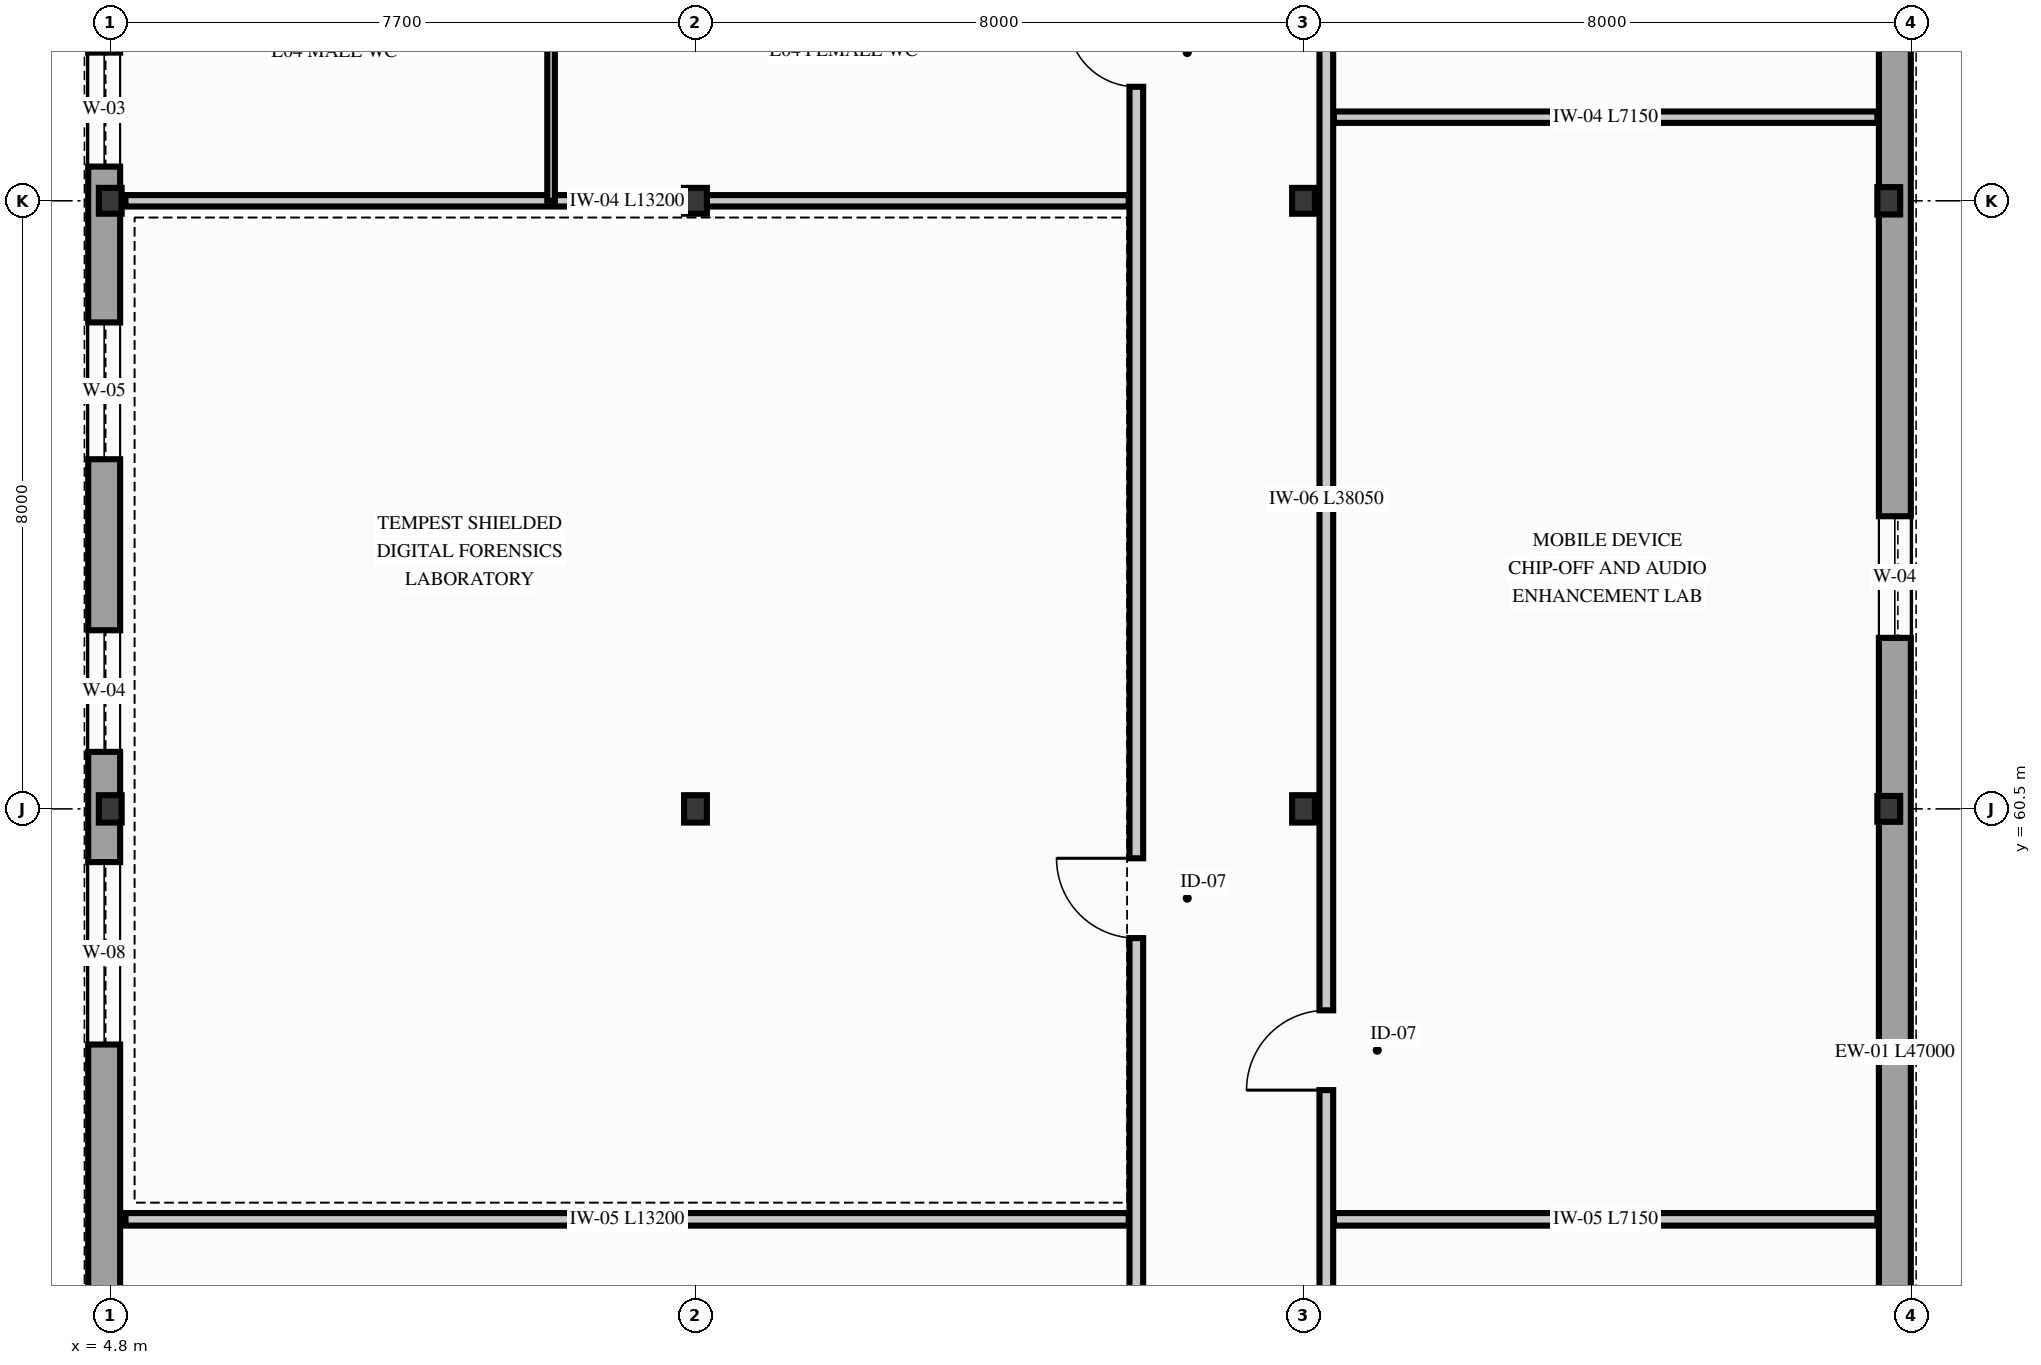
"""IFC4 building model, lengths in metres.
Left out: names, types, materials, properties, quantities, classifications, styles, units other than length and angle.
Written with IfcOpenShell. Run it as: python <this file> out.ifc"""

import sys

from ifc_helpers import new_model, si_unit, direction, frame, frame_2d, origin, origin_2d, place, context, subcontext, project, spatial, rectangle, i_section, extrude, element, fill, save


model = new_model("IFC4")
c1 = context("Model", 3, precision=1e-05, world=origin(), true_north=direction((0.0, 1.0)))
c2 = subcontext(c1, "Body", "Model", "MODEL_VIEW")
j1 = project(units=[si_unit("LENGTHUNIT", "METRE"), si_unit("PLANEANGLEUNIT", "RADIAN")], contexts=[c1])
p1 = place(None, origin())
s1 = spatial("IfcSite", under=j1, at=p1, CompositionType="ELEMENT")
p2 = place(p1, origin())
s2 = spatial("IfcBuilding", under=s1, at=p2, CompositionType="ELEMENT")
p3 = place(p2, frame((0.0, 0.0, 17.7)))
s3 = spatial("IfcBuildingStorey", under=s2, at=p3, CompositionType="ELEMENT", Elevation=17.7)
p4 = place(p3, frame((4.8, 60.5, 0.0), z_axis=(0.0, 0.0, 1.0), x_axis=(1.0, 0.0, 0.0)))
e1 = element("IfcColumn", 1, at=p4, inside=s3, PredefinedType="COLUMN", context=c2, shape_type="SweptSolid", body=[
    extrude(i_section(OverallWidth=0.3, OverallDepth=0.36, WebThickness=0.012, FlangeThickness=0.022, FilletRadius=0.027, at=origin_2d()), origin(), (0.0, 0.0, 1.0), 3.9),
])
p5 = place(p3, frame((4.8, 68.5, 0.0), z_axis=(0.0, 0.0, 1.0), x_axis=(1.0, 0.0, 0.0)))
e2 = element("IfcColumn", 2, at=p5, inside=s3, PredefinedType="COLUMN", context=c2, shape_type="SweptSolid", body=[
    extrude(i_section(OverallWidth=0.3, OverallDepth=0.34, WebThickness=0.012, FlangeThickness=0.021, FilletRadius=0.027, at=origin_2d()), origin(), (0.0, 0.0, 1.0), 3.9),
])
p6 = place(p3, frame((12.5, 60.5, 0.0), z_axis=(0.0, 0.0, 1.0), x_axis=(1.0, 0.0, 0.0)))
e3 = element("IfcColumn", 3, at=p6, inside=s3, PredefinedType="COLUMN", context=c2, shape_type="SweptSolid", body=[
    extrude(i_section(OverallWidth=0.3, OverallDepth=0.36, WebThickness=0.012, FlangeThickness=0.022, FilletRadius=0.027, at=origin_2d()), origin(), (0.0, 0.0, 1.0), 3.9),
])
p7 = place(p3, frame((12.5, 68.5, 0.0), z_axis=(0.0, 0.0, 1.0), x_axis=(1.0, 0.0, 0.0)))
e4 = element("IfcColumn", 4, at=p7, inside=s3, PredefinedType="COLUMN", context=c2, shape_type="SweptSolid", body=[
    extrude(i_section(OverallWidth=0.3, OverallDepth=0.34, WebThickness=0.012, FlangeThickness=0.021, FilletRadius=0.027, at=origin_2d()), origin(), (0.0, 0.0, 1.0), 3.9),
])
p8 = place(p3, frame((20.5, 60.5, 0.0), z_axis=(0.0, 0.0, 1.0), x_axis=(1.0, 0.0, 0.0)))
e5 = element("IfcColumn", 5, at=p8, inside=s3, PredefinedType="COLUMN", context=c2, shape_type="SweptSolid", body=[
    extrude(i_section(OverallWidth=0.3, OverallDepth=0.36, WebThickness=0.012, FlangeThickness=0.022, FilletRadius=0.027, at=origin_2d()), origin(), (0.0, 0.0, 1.0), 3.9),
])
for number, where, z_axis, x_axis in (
    (6, (20.5, 68.5, 0.0), (0.0, 0.0, 1.0), (1.0, 0.0, 0.0)),
    (7, (28.2, 60.5, 0.0), (0.0, 0.0, 1.0), (1.0, 0.0, 0.0)),
):
    element("IfcColumn", number, at=place(p3, frame(where, z_axis=z_axis, x_axis=x_axis)), inside=s3, PredefinedType="COLUMN", context=c2, shape_type="SweptSolid", body=[
        extrude(i_section(OverallWidth=0.3, OverallDepth=0.34, WebThickness=0.012, FlangeThickness=0.021, FilletRadius=0.027, at=origin_2d()), origin(), (0.0, 0.0, 1.0), 3.9),
    ])
p9 = place(p3, frame((28.2, 68.5, 0.0), z_axis=(0.0, 0.0, 1.0), x_axis=(1.0, 0.0, 0.0)))
e8 = element("IfcColumn", 8, at=p9, inside=s3, PredefinedType="COLUMN", context=c2, shape_type="SweptSolid", body=[
    extrude(i_section(OverallWidth=0.3, OverallDepth=0.36, WebThickness=0.012, FlangeThickness=0.022, FilletRadius=0.027, at=origin_2d()), origin(), (0.0, 0.0, 1.0), 3.9),
])
p10 = place(p3, frame((4.72, 36.5, 0.0), z_axis=(0.0, 0.0, 1.0), x_axis=(0.0, 1.0, 0.0)))
e9 = element("IfcWall", 9, at=p10, inside=s3, PredefinedType="SOLIDWALL", context=c2, shape_type="SweptSolid", body=[
    extrude(rectangle(XDim=47.0, YDim=0.42, at=frame_2d((23.5, 0.0))), origin(), (0.0, 0.0, 1.0), 3.42),
])
p11 = place(p10, frame((1.65, 0.0, 0.74)))
e10 = element("IfcOpeningElement", 10, at=p11, cuts=e9, PredefinedType="OPENING", context=c2, shape_type="SweptSolid", body=[
    extrude(rectangle(XDim=1.6, YDim=2.4, at=frame_2d((0.8, 1.2))), frame((0.0, 0.22, 0.0), z_axis=(0.0, -1.0, 0.0), x_axis=(1.0, 0.0, 0.0)), (0.0, 0.0, 1.0), 0.44),
])
p12 = place(p10, frame((5.5, 0.0, 0.74)))
e11 = element("IfcOpeningElement", 11, at=p12, cuts=e9, PredefinedType="OPENING", context=c2, shape_type="SweptSolid", body=[
    extrude(rectangle(XDim=1.8, YDim=2.4, at=frame_2d((0.9, 1.2))), frame((0.0, 0.22, 0.0), z_axis=(0.0, -1.0, 0.0), x_axis=(1.0, 0.0, 0.0)), (0.0, 0.0, 1.0), 0.44),
])
p13 = place(p10, frame((9.35, 0.0, 0.84)))
e12 = element("IfcOpeningElement", 12, at=p13, cuts=e9, PredefinedType="OPENING", context=c2, shape_type="SweptSolid", body=[
    extrude(rectangle(XDim=1.5, YDim=2.3, at=frame_2d((0.75, 1.15))), frame((0.0, 0.22, 0.0), z_axis=(0.0, -1.0, 0.0), x_axis=(1.0, 0.0, 0.0)), (0.0, 0.0, 1.0), 0.44),
])
p14 = place(p10, frame((13.2, 0.0, 0.85)))
e13 = element("IfcOpeningElement", 13, at=p14, cuts=e9, PredefinedType="OPENING", context=c2, shape_type="SweptSolid", body=[
    extrude(rectangle(XDim=1.4, YDim=2.2, at=frame_2d((0.7, 1.1))), frame((0.0, 0.22, 0.0), z_axis=(0.0, -1.0, 0.0), x_axis=(1.0, 0.0, 0.0)), (0.0, 0.0, 1.0), 0.44),
])
p15 = place(p10, frame((20.9, 0.0, 0.74)))
e14 = element("IfcOpeningElement", 14, at=p15, cuts=e9, PredefinedType="OPENING", context=c2, shape_type="SweptSolid", body=[
    extrude(rectangle(XDim=2.4, YDim=2.4, at=frame_2d((1.2, 1.2))), frame((0.0, 0.22, 0.0), z_axis=(0.0, -1.0, 0.0), x_axis=(1.0, 0.0, 0.0)), (0.0, 0.0, 1.0), 0.44),
])
p16 = place(p10, frame((24.75, 0.0, 0.74)))
e15 = element("IfcOpeningElement", 15, at=p16, cuts=e9, PredefinedType="OPENING", context=c2, shape_type="SweptSolid", body=[
    extrude(rectangle(XDim=1.6, YDim=2.4, at=frame_2d((0.8, 1.2))), frame((0.0, 0.22, 0.0), z_axis=(0.0, -1.0, 0.0), x_axis=(1.0, 0.0, 0.0)), (0.0, 0.0, 1.0), 0.44),
])
p17 = place(p10, frame((28.6, 0.0, 0.74)))
e16 = element("IfcOpeningElement", 16, at=p17, cuts=e9, PredefinedType="OPENING", context=c2, shape_type="SweptSolid", body=[
    extrude(rectangle(XDim=1.8, YDim=2.4, at=frame_2d((0.9, 1.2))), frame((0.0, 0.22, 0.0), z_axis=(0.0, -1.0, 0.0), x_axis=(1.0, 0.0, 0.0)), (0.0, 0.0, 1.0), 0.44),
])
p18 = place(p10, frame((32.45, 0.0, 0.84)))
e17 = element("IfcOpeningElement", 17, at=p18, cuts=e9, PredefinedType="OPENING", context=c2, shape_type="SweptSolid", body=[
    extrude(rectangle(XDim=1.5, YDim=2.3, at=frame_2d((0.75, 1.15))), frame((0.0, 0.22, 0.0), z_axis=(0.0, -1.0, 0.0), x_axis=(1.0, 0.0, 0.0)), (0.0, 0.0, 1.0), 0.44),
])
p19 = place(p3, frame((28.28, 36.5, 0.0), z_axis=(0.0, 0.0, 1.0), x_axis=(0.0, 1.0, 0.0)))
e18 = element("IfcWall", 18, at=p19, inside=s3, PredefinedType="SOLIDWALL", context=c2, shape_type="SweptSolid", body=[
    extrude(rectangle(XDim=47.0, YDim=0.42, at=frame_2d((23.5, 0.0))), origin(), (0.0, 0.0, 1.0), 3.42),
])
p20 = place(p19, frame((1.65, 0.0, 0.74)))
e19 = element("IfcOpeningElement", 19, at=p20, cuts=e18, PredefinedType="OPENING", context=c2, shape_type="SweptSolid", body=[
    extrude(rectangle(XDim=1.6, YDim=2.4, at=frame_2d((0.8, 1.2))), frame((0.0, 0.22, 0.0), z_axis=(0.0, -1.0, 0.0), x_axis=(1.0, 0.0, 0.0)), (0.0, 0.0, 1.0), 0.44),
])
p21 = place(p19, frame((5.75, 0.0, 0.74)))
e20 = element("IfcOpeningElement", 20, at=p21, cuts=e18, PredefinedType="OPENING", context=c2, shape_type="SweptSolid", body=[
    extrude(rectangle(XDim=1.8, YDim=2.4, at=frame_2d((0.9, 1.2))), frame((0.0, 0.22, 0.0), z_axis=(0.0, -1.0, 0.0), x_axis=(1.0, 0.0, 0.0)), (0.0, 0.0, 1.0), 0.44),
])
p22 = place(p19, frame((9.85, 0.0, 0.84)))
e21 = element("IfcOpeningElement", 21, at=p22, cuts=e18, PredefinedType="OPENING", context=c2, shape_type="SweptSolid", body=[
    extrude(rectangle(XDim=1.5, YDim=2.3, at=frame_2d((0.75, 1.15))), frame((0.0, 0.22, 0.0), z_axis=(0.0, -1.0, 0.0), x_axis=(1.0, 0.0, 0.0)), (0.0, 0.0, 1.0), 0.44),
])
p23 = place(p19, frame((13.95, 0.0, 0.85)))
e22 = element("IfcOpeningElement", 22, at=p23, cuts=e18, PredefinedType="OPENING", context=c2, shape_type="SweptSolid", body=[
    extrude(rectangle(XDim=1.4, YDim=2.2, at=frame_2d((0.7, 1.1))), frame((0.0, 0.22, 0.0), z_axis=(0.0, -1.0, 0.0), x_axis=(1.0, 0.0, 0.0)), (0.0, 0.0, 1.0), 0.44),
])
p24 = place(p19, frame((26.25, 0.0, 0.74)))
e23 = element("IfcOpeningElement", 23, at=p24, cuts=e18, PredefinedType="OPENING", context=c2, shape_type="SweptSolid", body=[
    extrude(rectangle(XDim=1.6, YDim=2.4, at=frame_2d((0.8, 1.2))), frame((0.0, 0.22, 0.0), z_axis=(0.0, -1.0, 0.0), x_axis=(1.0, 0.0, 0.0)), (0.0, 0.0, 1.0), 0.44),
])
p25 = place(p19, frame((34.45, 0.0, 0.84)))
e24 = element("IfcOpeningElement", 24, at=p25, cuts=e18, PredefinedType="OPENING", context=c2, shape_type="SweptSolid", body=[
    extrude(rectangle(XDim=1.5, YDim=2.3, at=frame_2d((0.75, 1.15))), frame((0.0, 0.22, 0.0), z_axis=(0.0, -1.0, 0.0), x_axis=(1.0, 0.0, 0.0)), (0.0, 0.0, 1.0), 0.44),
])
p26 = place(p19, frame((42.65, 0.0, 0.54)))
e25 = element("IfcOpeningElement", 25, at=p26, cuts=e18, PredefinedType="OPENING", context=c2, shape_type="SweptSolid", body=[
    extrude(rectangle(XDim=2.2, YDim=2.6, at=frame_2d((1.1, 1.3))), frame((0.0, 0.22, 0.0), z_axis=(0.0, -1.0, 0.0), x_axis=(1.0, 0.0, 0.0)), (0.0, 0.0, 1.0), 0.44),
])
p27 = place(p3, frame((18.3, 36.8, 0.0), z_axis=(0.0, 0.0, 1.0), x_axis=(0.0, 1.0, 0.0)))
e26 = element("IfcWall", 26, at=p27, inside=s3, PredefinedType="PARTITIONING", context=c2, shape_type="SweptSolid", body=[
    extrude(rectangle(XDim=35.95, YDim=0.18, at=frame_2d((17.975, 0.0))), origin(), (0.0, 0.0, 1.0), 3.418),
])
p28 = place(p27, frame((7.0, 0.0, 0.0)))
e27 = element("IfcOpeningElement", 27, at=p28, cuts=e26, PredefinedType="OPENING", context=c2, shape_type="SweptSolid", body=[
    extrude(rectangle(XDim=1.02, YDim=2.18, at=frame_2d((0.51, 1.09))), frame((0.0, 0.1, 0.0), z_axis=(0.0, -1.0, 0.0), x_axis=(1.0, 0.0, 0.0)), (0.0, 0.0, 1.0), 0.2),
])
p29 = place(p27, frame((22.0, 0.0, 0.0)))
e28 = element("IfcOpeningElement", 28, at=p29, cuts=e26, PredefinedType="OPENING", context=c2, shape_type="SweptSolid", body=[
    extrude(rectangle(XDim=1.05, YDim=2.2, at=frame_2d((0.525, 1.1))), frame((0.0, 0.1, 0.0), z_axis=(0.0, -1.0, 0.0), x_axis=(1.0, 0.0, 0.0)), (0.0, 0.0, 1.0), 0.2),
])
p30 = place(p27, frame((33.2, 0.0, 0.0)))
e29 = element("IfcOpeningElement", 29, at=p30, cuts=e26, PredefinedType="OPENING", context=c2, shape_type="SweptSolid", body=[
    extrude(rectangle(XDim=0.9, YDim=2.1, at=frame_2d((0.45, 1.05))), frame((0.0, 0.1, 0.0), z_axis=(0.0, -1.0, 0.0), x_axis=(1.0, 0.0, 0.0)), (0.0, 0.0, 1.0), 0.2),
])
p31 = place(p3, frame((20.8, 36.8, 0.0), z_axis=(0.0, 0.0, 1.0), x_axis=(0.0, 1.0, 0.0)))
e30 = element("IfcWall", 30, at=p31, inside=s3, PredefinedType="PARTITIONING", context=c2, shape_type="SweptSolid", body=[
    extrude(rectangle(XDim=38.05, YDim=0.18, at=frame_2d((19.025, 0.0))), origin(), (0.0, 0.0, 1.0), 3.418),
])
p32 = place(p31, frame((5.65, 0.0, 0.0)))
e31 = element("IfcOpeningElement", 31, at=p32, cuts=e30, PredefinedType="OPENING", context=c2, shape_type="SweptSolid", body=[
    extrude(rectangle(XDim=1.08, YDim=2.22, at=frame_2d((0.54, 1.11))), frame((0.0, 0.1, 0.0), z_axis=(0.0, -1.0, 0.0), x_axis=(1.0, 0.0, 0.0)), (0.0, 0.0, 1.0), 0.2),
])
p33 = place(p31, frame((20.0, 0.0, 0.0)))
e32 = element("IfcOpeningElement", 32, at=p33, cuts=e30, PredefinedType="OPENING", context=c2, shape_type="SweptSolid", body=[
    extrude(rectangle(XDim=1.05, YDim=2.2, at=frame_2d((0.525, 1.1))), frame((0.0, 0.1, 0.0), z_axis=(0.0, -1.0, 0.0), x_axis=(1.0, 0.0, 0.0)), (0.0, 0.0, 1.0), 0.2),
])
p34 = place(p31, frame((34.5, 0.0, 0.0)))
e33 = element("IfcOpeningElement", 33, at=p34, cuts=e30, PredefinedType="OPENING", context=c2, shape_type="SweptSolid", body=[
    extrude(rectangle(XDim=0.95, YDim=2.15, at=frame_2d((0.475, 1.075))), frame((0.0, 0.1, 0.0), z_axis=(0.0, -1.0, 0.0), x_axis=(1.0, 0.0, 0.0)), (0.0, 0.0, 1.0), 0.2),
])
p35 = place(p3, frame((5.0, 55.1, 0.0), z_axis=(0.0, 0.0, 1.0), x_axis=(1.0, 0.0, 0.0)))
e34 = element("IfcWall", 34, at=p35, inside=s3, PredefinedType="PARTITIONING", context=c2, shape_type="SweptSolid", body=[
    extrude(rectangle(XDim=13.2, YDim=0.165, at=frame_2d((6.6, 0.0))), origin(), (0.0, 0.0, 1.0), 3.298),
])
p36 = place(p3, frame((20.9, 55.1, 0.0), z_axis=(0.0, 0.0, 1.0), x_axis=(1.0, 0.0, 0.0)))
e35 = element("IfcWall", 35, at=p36, inside=s3, PredefinedType="PARTITIONING", context=c2, shape_type="SweptSolid", body=[
    extrude(rectangle(XDim=7.15, YDim=0.165, at=frame_2d((3.575, 0.0))), origin(), (0.0, 0.0, 1.0), 3.45),
])
p37 = place(p3, frame((5.0, 68.5, 0.0), z_axis=(0.0, 0.0, 1.0), x_axis=(1.0, 0.0, 0.0)))
e36 = element("IfcWall", 36, at=p37, inside=s3, PredefinedType="PARTITIONING", context=c2, shape_type="SweptSolid", body=[
    extrude(rectangle(XDim=13.2, YDim=0.15, at=frame_2d((6.6, 0.0))), origin(), (0.0, 0.0, 1.0), 3.29),
])
p38 = place(p3, frame((10.6, 68.5, 0.0), z_axis=(0.0, 0.0, 1.0), x_axis=(0.0, 1.0, 0.0)))
e37 = element("IfcWall", 37, at=p38, inside=s3, PredefinedType="PARTITIONING", context=c2, shape_type="SweptSolid", body=[
    extrude(rectangle(XDim=4.25, YDim=0.1, at=frame_2d((2.125, 0.0))), origin(), (0.0, 0.0, 1.0), 3.68),
])
p39 = place(p3, frame((20.9, 69.6, 0.0), z_axis=(0.0, 0.0, 1.0), x_axis=(1.0, 0.0, 0.0)))
e38 = element("IfcWall", 38, at=p39, inside=s3, PredefinedType="PARTITIONING", context=c2, shape_type="SweptSolid", body=[
    extrude(rectangle(XDim=7.15, YDim=0.15, at=frame_2d((3.575, 0.0))), origin(), (0.0, 0.0, 1.0), 3.68),
])
p40 = place(p24, origin())
e39 = element("IfcWindow", 39, at=p40, inside=s3, PartitioningType="SINGLE_PANEL", PredefinedType="WINDOW", context=c2, shape_type="SweptSolid", body=[
    extrude(rectangle(XDim=1.6, YDim=2.4, at=frame_2d((0.8, 1.2))), frame((0.0, 0.03, 0.0), z_axis=(0.0, -1.0, 0.0), x_axis=(1.0, 0.0, 0.0)), (0.0, 0.0, 1.0), 0.06),
])
fill(e23, e39)
p41 = place(p15, origin())
e40 = element("IfcWindow", 40, at=p41, inside=s3, PartitioningType="SINGLE_PANEL", PredefinedType="WINDOW", context=c2, shape_type="SweptSolid", body=[
    extrude(rectangle(XDim=2.4, YDim=2.4, at=frame_2d((1.2, 1.2))), frame((0.0, 0.03, 0.0), z_axis=(0.0, -1.0, 0.0), x_axis=(1.0, 0.0, 0.0)), (0.0, 0.0, 1.0), 0.06),
])
fill(e14, e40)
p42 = place(p16, origin())
e41 = element("IfcWindow", 41, at=p42, inside=s3, PartitioningType="SINGLE_PANEL", PredefinedType="WINDOW", context=c2, shape_type="SweptSolid", body=[
    extrude(rectangle(XDim=1.6, YDim=2.4, at=frame_2d((0.8, 1.2))), frame((0.0, 0.03, 0.0), z_axis=(0.0, -1.0, 0.0), x_axis=(1.0, 0.0, 0.0)), (0.0, 0.0, 1.0), 0.06),
])
fill(e15, e41)
p43 = place(p17, origin())
e42 = element("IfcWindow", 42, at=p43, inside=s3, PartitioningType="SINGLE_PANEL", PredefinedType="WINDOW", context=c2, shape_type="SweptSolid", body=[
    extrude(rectangle(XDim=1.8, YDim=2.4, at=frame_2d((0.9, 1.2))), frame((0.0, 0.03, 0.0), z_axis=(0.0, -1.0, 0.0), x_axis=(1.0, 0.0, 0.0)), (0.0, 0.0, 1.0), 0.06),
])
fill(e16, e42)
p44 = place(p18, origin())
e43 = element("IfcWindow", 43, at=p44, inside=s3, PartitioningType="SINGLE_PANEL", PredefinedType="WINDOW", context=c2, shape_type="SweptSolid", body=[
    extrude(rectangle(XDim=1.5, YDim=2.3, at=frame_2d((0.75, 1.15))), frame((0.0, 0.03, 0.0), z_axis=(0.0, -1.0, 0.0), x_axis=(1.0, 0.0, 0.0)), (0.0, 0.0, 1.0), 0.06),
])
fill(e17, e43)
p45 = place(p29, origin())
e44 = element("IfcDoor", 44, at=p45, inside=s3, OperationType="SINGLE_SWING_RIGHT", PredefinedType="DOOR", context=c2, shape_type="SweptSolid", body=[
    extrude(rectangle(XDim=1.05, YDim=2.2, at=frame_2d((0.525, 1.1))), frame((0.0, 0.025, 0.0), z_axis=(0.0, -1.0, 0.0), x_axis=(1.0, 0.0, 0.0)), (0.0, 0.0, 1.0), 0.05),
])
fill(e28, e44)
p46 = place(p33, origin())
e45 = element("IfcDoor", 45, at=p46, inside=s3, OperationType="SINGLE_SWING_LEFT", PredefinedType="DOOR", context=c2, shape_type="SweptSolid", body=[
    extrude(rectangle(XDim=1.05, YDim=2.2, at=frame_2d((0.525, 1.1))), frame((0.0, 0.025, 0.0), z_axis=(0.0, -1.0, 0.0), x_axis=(1.0, 0.0, 0.0)), (0.0, 0.0, 1.0), 0.05),
])
fill(e32, e45)
p47 = place(p30, origin())
e46 = element("IfcDoor", 46, at=p47, inside=s3, OperationType="SINGLE_SWING_RIGHT", PredefinedType="DOOR", context=c2, shape_type="SweptSolid", body=[
    extrude(rectangle(XDim=0.9, YDim=2.1, at=frame_2d((0.45, 1.05))), frame((0.0, 0.025, 0.0), z_axis=(0.0, -1.0, 0.0), x_axis=(1.0, 0.0, 0.0)), (0.0, 0.0, 1.0), 0.05),
])
fill(e29, e46)
save(model, sys.argv[1])
